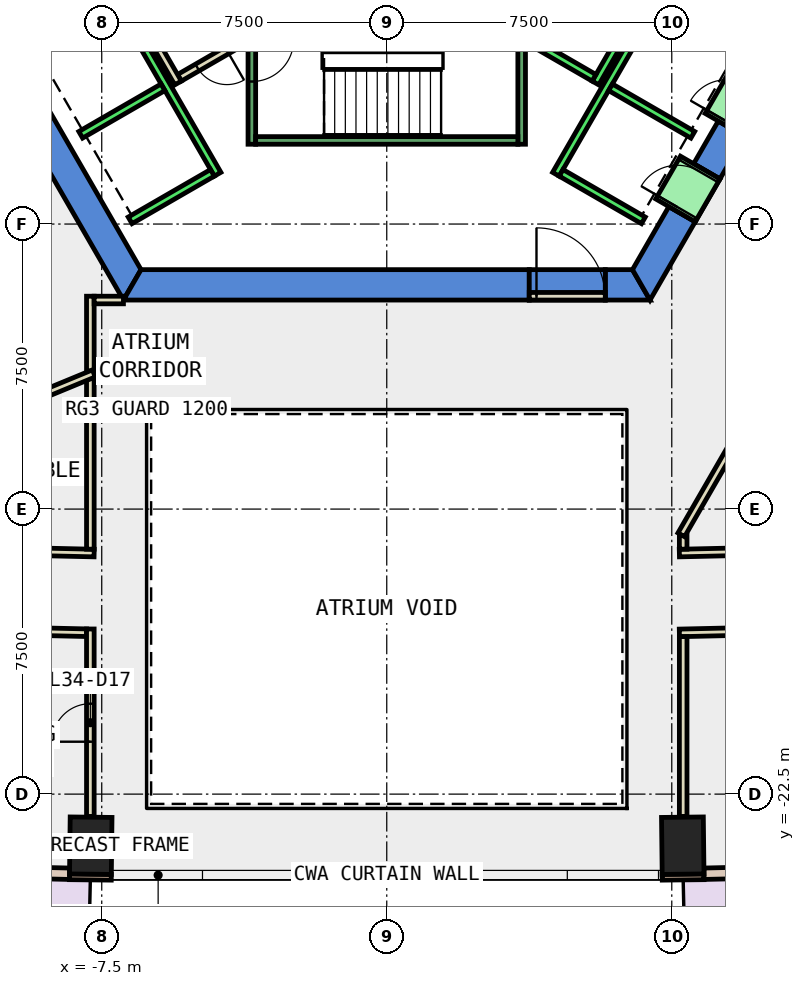
"""IFC4 building model, lengths in metres.
Left out: names, types, materials, properties, quantities, classifications, styles, units other than length and angle.
Written with IfcOpenShell. Run it as: python <this file> out.ifc"""

import sys

from ifc_helpers import new_model, si_unit, direction, frame, frame_2d, origin, origin_2d, place, context, subcontext, project, spatial, polyline, rectangle, outline, extrude, element, fill, save


model = new_model("IFC4")
c1 = context("Model", 3, precision=1e-05, world=origin(), true_north=direction((0.0, 1.0)))
c2 = subcontext(c1, "Body", "Model", "MODEL_VIEW")
j1 = project(units=[si_unit("LENGTHUNIT", "METRE"), si_unit("PLANEANGLEUNIT", "RADIAN")], contexts=[c1])
p1 = place(None, origin())
s1 = spatial("IfcSite", under=j1, at=p1, CompositionType="ELEMENT")
p2 = place(p1, origin())
s2 = spatial("IfcBuilding", under=s1, at=p2, CompositionType="ELEMENT")
p3 = place(p2, frame((0.0, 0.0, 155.0)))
s3 = spatial("IfcBuildingStorey", under=s2, at=p3, CompositionType="ELEMENT", Elevation=155.0)
for number, where, z_axis, x_axis in (
    (1, (-7.789, -23.857, -0.4), (0.0, 0.0, 1.0), (-1.0, 0.012, 0.0)),
    (2, (7.789, -23.857, -0.4), (0.0, 0.0, 1.0), (1.0, 0.012, 0.0)),
):
    element("IfcColumn", number, at=place(p3, frame(where, z_axis=z_axis, x_axis=x_axis)), inside=s3, PredefinedType="COLUMN", context=c2, shape_type="SweptSolid", body=[
        extrude(rectangle(XDim=1.1, YDim=1.5, at=origin_2d()), origin(), (0.0, 0.0, 1.0), 4.2),
    ])
p4 = place(p3, frame((0.0, 0.0, -0.4)))
e3 = element("IfcWall", 3, at=p4, inside=s3, PredefinedType="SHEAR", context=c2, shape_type="SweptSolid", body=[
    extrude(outline(polyline([(-13.856, 2.5), (-6.928, -9.5), (-6.466, -8.7), (-12.933, 2.5), (-13.856, 2.5)])), origin(), (0.0, 0.0, 1.0), 4.2),
])
p5 = place(p3, frame((0.0, 0.0, -0.4)))
e4 = element("IfcWall", 4, at=p5, inside=s3, PredefinedType="SHEAR", context=c2, shape_type="SweptSolid", body=[
    extrude(outline(polyline([(3.75, -9.5), (3.75, -8.7), (-6.466, -8.7), (-6.928, -9.5), (3.75, -9.5)])), origin(), (0.0, 0.0, 1.0), 4.2),
])
p6 = place(p3, frame((0.0, 0.0, -0.4)))
e5 = element("IfcWall", 5, at=p6, inside=s3, PredefinedType="SHEAR", context=c2, shape_type="SweptSolid", body=[
    extrude(outline(polyline([(5.75, -8.7), (5.75, -9.5), (6.928, -9.5), (6.466, -8.7), (5.75, -8.7)])), origin(), (0.0, 0.0, 1.0), 4.2),
])
p7 = place(p3, frame((0.0, 0.0, 3.6)))
e6 = element("IfcWall", 6, at=p7, inside=s3, PredefinedType="SHEAR", context=c2, shape_type="SweptSolid", body=[
    extrude(outline(polyline([(5.75, -9.5), (5.75, -8.7), (3.75, -8.7), (3.75, -9.5), (5.75, -9.5)])), origin(), (0.0, 0.0, 1.0), 0.2),
])
p8 = place(p3, frame((0.0, 0.0, -0.4)))
e7 = element("IfcWall", 7, at=p8, inside=s3, PredefinedType="SHEAR", context=c2, shape_type="SweptSolid", body=[
    extrude(outline(polyline([(8.117, -7.44), (7.424, -7.04), (6.466, -8.7), (6.928, -9.5), (8.117, -7.44)])), origin(), (0.0, 0.0, 1.0), 4.2),
])
p9 = place(p3, frame((0.0, 0.0, -0.4)))
e8 = element("IfcWall", 8, at=p9, inside=s3, PredefinedType="SHEAR", context=c2, shape_type="SweptSolid", body=[
    extrude(outline(polyline([(9.417, -5.189), (8.724, -4.789), (8.075, -5.914), (8.767, -6.314), (9.417, -5.189)])), origin(), (0.0, 0.0, 1.0), 4.2),
])
p10 = place(p3, frame((0.0, 0.0, 3.6)))
e9 = element("IfcWall", 9, at=p10, inside=s3, PredefinedType="SHEAR", context=c2, shape_type="SweptSolid", body=[
    extrude(outline(polyline([(8.767, -6.314), (8.075, -5.914), (7.424, -7.04), (8.117, -7.44), (8.767, -6.314)])), origin(), (0.0, 0.0, 1.0), 0.2),
])
p11 = place(p3, frame((0.0, 0.0, 3.6)))
e10 = element("IfcWall", 10, at=p11, inside=s3, PredefinedType="SHEAR", context=c2, shape_type="SweptSolid", body=[
    extrude(outline(polyline([(10.067, -4.063), (9.374, -3.663), (8.724, -4.789), (9.417, -5.189), (10.067, -4.063)])), origin(), (0.0, 0.0, 1.0), 0.2),
])
for number, where, z_axis, x_axis in (
    (11, (-8.349, -24.676, 0.0), (0.0, 0.0, 1.0), (1.0, -0.011, 0.0)),
    (12, (7.249, -24.688, 0.0), (0.0, 0.0, 1.0), (1.0, 0.011, 0.0)),
):
    element("IfcWall", number, at=place(p3, frame(where, z_axis=z_axis, x_axis=x_axis)), inside=s3, PredefinedType="STANDARD", context=c2, shape_type="SweptSolid", body=[
        extrude(rectangle(XDim=1.1, YDim=0.15, at=frame_2d((0.55, 0.0))), origin(), (0.0, 0.0, 1.0), 3.8),
    ])
p12 = place(p3, frame((-15.68, -24.429, 0.0), z_axis=(0.0, 0.0, 1.0), x_axis=(0.999743825009, -0.022633699594, 0.0)))
e13 = element("IfcWall", 13, at=p12, inside=s3, PredefinedType="STANDARD", context=c2, shape_type="SweptSolid", body=[
    extrude(rectangle(XDim=7.335, YDim=0.3, at=frame_2d((3.667, 0.0))), origin(), (0.0, 0.0, 1.0), 3.8),
])
p13 = place(p12, frame((0.834, 0.0, 0.0)))
e14 = element("IfcOpeningElement", 14, at=p13, cuts=e13, PredefinedType="OPENING", context=c2, shape_type="SweptSolid", body=[
    extrude(rectangle(XDim=2.0, YDim=2.4, at=frame_2d((1.0, 1.2))), frame((0.0, 0.16, 0.0), z_axis=(0.0, -1.0, 0.0), x_axis=(1.0, 0.0, 0.0)), (0.0, 0.0, 1.0), 0.32),
])
p14 = place(p12, frame((4.301, 0.0, 0.9)))
e15 = element("IfcOpeningElement", 15, at=p14, cuts=e13, PredefinedType="OPENING", context=c2, shape_type="SweptSolid", body=[
    extrude(rectangle(XDim=2.4, YDim=2.6, at=frame_2d((1.2, 1.3))), frame((0.0, 0.16, 0.0), z_axis=(0.0, -1.0, 0.0), x_axis=(1.0, 0.0, 0.0)), (0.0, 0.0, 1.0), 0.32),
])
p15 = place(p3, frame((8.347, -24.595, 0.0), z_axis=(0.0, 0.0, 1.0), x_axis=(0.999743825009, 0.022633699594, 0.0)))
e16 = element("IfcWall", 16, at=p15, inside=s3, PredefinedType="STANDARD", context=c2, shape_type="SweptSolid", body=[
    extrude(rectangle(XDim=7.335, YDim=0.3, at=frame_2d((3.667, 0.0))), origin(), (0.0, 0.0, 1.0), 3.8),
])
p16 = place(p15, frame((0.834, 0.0, 0.0)))
e17 = element("IfcOpeningElement", 17, at=p16, cuts=e16, PredefinedType="OPENING", context=c2, shape_type="SweptSolid", body=[
    extrude(rectangle(XDim=2.0, YDim=2.4, at=frame_2d((1.0, 1.2))), frame((0.0, 0.16, 0.0), z_axis=(0.0, -1.0, 0.0), x_axis=(1.0, 0.0, 0.0)), (0.0, 0.0, 1.0), 0.32),
])
p17 = place(p15, frame((4.301, 0.0, 0.9)))
e18 = element("IfcOpeningElement", 18, at=p17, cuts=e16, PredefinedType="OPENING", context=c2, shape_type="SweptSolid", body=[
    extrude(rectangle(XDim=2.4, YDim=2.6, at=frame_2d((1.2, 1.3))), frame((0.0, 0.16, 0.0), z_axis=(0.0, -1.0, 0.0), x_axis=(1.0, 0.0, 0.0)), (0.0, 0.0, 1.0), 0.32),
])
p18 = place(p3, frame((7.7, -16.157, 0.0), z_axis=(0.0, 0.0, 1.0), x_axis=(0.999744539931, 0.022602098978, 0.0)))
e19 = element("IfcWall", 19, at=p18, inside=s3, PredefinedType="PARTITIONING", context=c2, shape_type="SweptSolid", body=[
    extrude(rectangle(XDim=8.274, YDim=0.2, at=frame_2d((4.137, 0.0))), origin(), (0.0, 0.0, 1.0), 3.8),
])
p19 = place(p18, frame((3.237, 0.0, 0.0)))
e20 = element("IfcOpeningElement", 20, at=p19, cuts=e19, PredefinedType="OPENING", context=c2, shape_type="SweptSolid", body=[
    extrude(rectangle(XDim=1.8, YDim=2.1, at=frame_2d((0.9, 1.05))), frame((0.0, 0.11, 0.0), z_axis=(0.0, -1.0, 0.0), x_axis=(1.0, 0.0, 0.0)), (0.0, 0.0, 1.0), 0.22),
])
p20 = place(p3, frame((-14.356, -16.006, 0.0), z_axis=(0.0, 0.0, 1.0), x_axis=(0.999743177933, -0.022662263286, 0.0)))
e21 = element("IfcWall", 21, at=p20, inside=s3, PredefinedType="PARTITIONING", context=c2, shape_type="SweptSolid", body=[
    extrude(rectangle(XDim=6.658, YDim=0.2, at=frame_2d((3.329, 0.0))), origin(), (0.0, 0.0, 1.0), 3.8),
])
p21 = place(p20, frame((2.829, 0.0, 0.0)))
e22 = element("IfcOpeningElement", 22, at=p21, cuts=e21, PredefinedType="OPENING", context=c2, shape_type="SweptSolid", body=[
    extrude(rectangle(XDim=1.0, YDim=2.1, at=frame_2d((0.5, 1.05))), frame((0.0, 0.11, 0.0), z_axis=(0.0, -1.0, 0.0), x_axis=(1.0, 0.0, 0.0)), (0.0, 0.0, 1.0), 0.22),
])
p22 = place(p3, frame((16.111, -18.067, 0.0), z_axis=(0.0, 0.0, 1.0), x_axis=(-0.999741835545, -0.022721405353, 0.0)))
e23 = element("IfcWall", 23, at=p22, inside=s3, PredefinedType="PARTITIONING", context=c2, shape_type="SweptSolid", body=[
    extrude(rectangle(XDim=8.413, YDim=0.2, at=frame_2d((4.207, 0.0))), origin(), (0.0, 0.0, 1.0), 3.8),
])
p23 = place(p22, frame((3.706, 0.0, 0.0)))
e24 = element("IfcOpeningElement", 24, at=p23, cuts=e23, PredefinedType="OPENING", context=c2, shape_type="SweptSolid", body=[
    extrude(rectangle(XDim=1.0, YDim=2.1, at=frame_2d((0.5, 1.05))), frame((0.0, 0.11, 0.0), z_axis=(0.0, -1.0, 0.0), x_axis=(1.0, 0.0, 0.0)), (0.0, 0.0, 1.0), 0.22),
])
p24 = place(p3, frame((-7.9, -18.253, 0.0), z_axis=(0.0, 0.0, 1.0), x_axis=(-0.999745510411, 0.022559131487, 0.0)))
e25 = element("IfcWall", 25, at=p24, inside=s3, PredefinedType="PARTITIONING", context=c2, shape_type="SweptSolid", body=[
    extrude(rectangle(XDim=3.896, YDim=0.2, at=frame_2d((1.948, 0.0))), origin(), (0.0, 0.0, 1.0), 3.8),
])
p25 = place(p3, frame((-3.65, -2.61, 0.0), z_axis=(0.0, 0.0, 1.0), x_axis=(-0.866072462134, -0.499918483688, 0.0)))
e26 = element("IfcWall", 26, at=p25, inside=s3, PredefinedType="PARTITIONING", context=c2, shape_type="SweptSolid", body=[
    extrude(rectangle(XDim=2.084, YDim=0.2, at=frame_2d((1.042, 0.0))), origin(), (0.0, 0.0, 1.0), 3.8),
])
p26 = place(p25, frame((0.642, 0.0, 0.0)))
e27 = element("IfcOpeningElement", 27, at=p26, cuts=e26, PredefinedType="OPENING", context=c2, shape_type="SweptSolid", body=[
    extrude(rectangle(XDim=0.9, YDim=2.1, at=frame_2d((0.45, 1.05))), frame((0.0, 0.11, 0.0), z_axis=(0.0, -1.0, 0.0), x_axis=(1.0, 0.0, 0.0)), (0.0, 0.0, 1.0), 0.22),
])
p27 = place(p3, frame((-5.492, -3.788, 0.0), z_axis=(0.0, 0.0, 1.0), x_axis=(-0.500008949224, 0.866020236886, 0.0)))
e28 = element("IfcWall", 28, at=p27, inside=s3, PredefinedType="PARTITIONING", context=c2, shape_type="SweptSolid", body=[
    extrude(rectangle(XDim=2.68, YDim=0.2, at=frame_2d((1.34, 0.0))), origin(), (0.0, 0.0, 1.0), 3.8),
])
p28 = place(p3, frame((7.8, -15.69, 0.0), z_axis=(0.0, 0.0, 1.0), x_axis=(0.0, -1.0, 0.0)))
e29 = element("IfcWall", 29, at=p28, inside=s3, PredefinedType="PARTITIONING", context=c2, shape_type="SweptSolid", body=[
    extrude(rectangle(XDim=0.365, YDim=0.2, at=frame_2d((0.183, 0.0))), origin(), (0.0, 0.0, 1.0), 3.8),
])
p29 = place(p3, frame((-7.8, -11.368, 0.0), z_axis=(0.0, 0.0, 1.0), x_axis=(0.0, 1.0, 0.0)))
e30 = element("IfcWall", 30, at=p29, inside=s3, PredefinedType="PARTITIONING", context=c2, shape_type="SweptSolid", body=[
    extrude(rectangle(XDim=1.969, YDim=0.2, at=frame_2d((0.984, 0.0))), origin(), (0.0, 0.0, 1.0), 3.8),
])
p30 = place(p3, frame((-7.7, -9.499, 0.0), z_axis=(0.0, 0.0, 1.0), x_axis=(1.0, 0.0, 0.0)))
e31 = element("IfcWall", 31, at=p30, inside=s3, PredefinedType="PARTITIONING", context=c2, shape_type="SweptSolid", body=[
    extrude(rectangle(XDim=0.771, YDim=0.2, at=frame_2d((0.385, 0.0))), origin(), (0.0, 0.0, 1.0), 3.8),
])
p31 = place(p3, frame((-7.8, -16.055, 0.0), z_axis=(0.0, 0.0, 1.0), x_axis=(0.0, 1.0, 0.0)))
e32 = element("IfcWall", 32, at=p31, inside=s3, PredefinedType="PARTITIONING", context=c2, shape_type="SweptSolid", body=[
    extrude(rectangle(XDim=4.487, YDim=0.2, at=frame_2d((2.243, 0.0))), origin(), (0.0, 0.0, 1.0), 3.8),
])
p32 = place(p3, frame((7.8, -18.355, 0.0), z_axis=(0.0, 0.0, 1.0), x_axis=(0.0, -1.0, 0.0)))
e33 = element("IfcWall", 33, at=p32, inside=s3, PredefinedType="PARTITIONING", context=c2, shape_type="SweptSolid", body=[
    extrude(rectangle(XDim=4.732, YDim=0.2, at=frame_2d((2.366, 0.0))), origin(), (0.0, 0.0, 1.0), 3.8),
])
p33 = place(p3, frame((-7.8, -23.087, 0.0), z_axis=(0.0, 0.0, 1.0), x_axis=(0.0, 1.0, 0.0)))
e34 = element("IfcWall", 34, at=p33, inside=s3, PredefinedType="PARTITIONING", context=c2, shape_type="SweptSolid", body=[
    extrude(rectangle(XDim=4.932, YDim=0.2, at=frame_2d((2.466, 0.0))), origin(), (0.0, 0.0, 1.0), 3.8),
])
p34 = place(p33, frame((1.966, 0.0, 0.0)))
e35 = element("IfcOpeningElement", 35, at=p34, cuts=e34, PredefinedType="OPENING", context=c2, shape_type="SweptSolid", body=[
    extrude(rectangle(XDim=1.0, YDim=2.1, at=frame_2d((0.5, 1.05))), frame((0.0, 0.11, 0.0), z_axis=(0.0, -1.0, 0.0), x_axis=(1.0, 0.0, 0.0)), (0.0, 0.0, 1.0), 0.22),
])
p35 = place(p3, frame((-7.708, -11.43, 0.0), z_axis=(0.0, 0.0, 1.0), x_axis=(-0.924285151797, -0.381702709144, 0.0)))
e36 = element("IfcWall", 36, at=p35, inside=s3, PredefinedType="PARTITIONING", context=c2, shape_type="SweptSolid", body=[
    extrude(rectangle(XDim=8.129, YDim=0.2, at=frame_2d((4.065, 0.0))), origin(), (0.0, 0.0, 1.0), 3.8),
])
p36 = place(p3, frame((3.75, -9.4, 0.0), z_axis=(0.0, 0.0, 1.0), x_axis=(1.0, 0.0, 0.0)))
e37 = element("IfcWall", 37, at=p36, inside=s3, PredefinedType="PARTITIONING", context=c2, shape_type="SweptSolid", body=[
    extrude(rectangle(XDim=2.0, YDim=0.2, at=frame_2d((1.0, 0.0))), origin(), (0.0, 0.0, 1.0), 2.4),
])
p37 = place(p36, frame((0.19, 0.0, 0.0)))
e38 = element("IfcOpeningElement", 38, at=p37, cuts=e37, PredefinedType="OPENING", context=c2, shape_type="SweptSolid", body=[
    extrude(rectangle(XDim=1.8, YDim=2.1, at=frame_2d((0.9, 1.05))), frame((0.0, 0.11, 0.0), z_axis=(0.0, -1.0, 0.0), x_axis=(1.0, 0.0, 0.0)), (0.0, 0.0, 1.0), 0.22),
])
p38 = place(p3, frame((12.401, -7.621, 0.0), z_axis=(0.0, 0.0, 1.0), x_axis=(-0.499983724212, -0.866034800411, 0.0)))
e39 = element("IfcWall", 39, at=p38, inside=s3, PredefinedType="PARTITIONING", context=c2, shape_type="SweptSolid", body=[
    extrude(rectangle(XDim=9.302, YDim=0.2, at=frame_2d((4.651, 0.0))), origin(), (0.0, 0.0, 1.0), 3.8),
])
p39 = place(p3, frame((-9.751, 2.99, 0.0), z_axis=(0.0, 0.0, 1.0), x_axis=(0.50000090737, -0.866024879913, 0.0)))
e40 = element("IfcWall", 40, at=p39, inside=s3, PredefinedType="STANDARD", context=c2, shape_type="SweptSolid", body=[
    extrude(rectangle(XDim=10.6, YDim=0.2, at=frame_2d((5.3, 0.0))), origin(), (0.0, 0.0, 1.0), 3.8),
])
for number, where, z_axis, x_axis in (
    (41, (-5.888, -3.902, 0.0), (0.0, 0.0, 1.0), (-0.866, -0.5, 0.0)),
    (42, (-4.588, -6.153, 0.0), (0.0, 0.0, 1.0), (-0.866, -0.5, 0.0)),
):
    element("IfcWall", number, at=place(p3, frame(where, z_axis=z_axis, x_axis=x_axis)), inside=s3, PredefinedType="STANDARD", context=c2, shape_type="SweptSolid", body=[
        extrude(rectangle(XDim=2.5, YDim=0.2, at=frame_2d((1.25, 0.0))), origin(), (0.0, 0.0, 1.0), 3.8),
    ])
p40 = place(p3, frame((5.492, -3.788, 0.0), z_axis=(0.0, 0.0, 1.0), x_axis=(0.500011755427, 0.866018616679, 0.0)))
e43 = element("IfcWall", 43, at=p40, inside=s3, PredefinedType="STANDARD", context=c2, shape_type="SweptSolid", body=[
    extrude(rectangle(XDim=2.8, YDim=0.2, at=frame_2d((1.4, 0.0))), origin(), (0.0, 0.0, 1.0), 3.8),
])
p41 = place(p3, frame((3.377, -2.452, 0.0), z_axis=(0.0, 0.0, 1.0), x_axis=(0.865955154139, -0.50012165622, 0.0)))
e44 = element("IfcWall", 44, at=p41, inside=s3, PredefinedType="STANDARD", context=c2, shape_type="SweptSolid", body=[
    extrude(rectangle(XDim=2.4, YDim=0.2, at=frame_2d((1.2, 0.0))), origin(), (0.0, 0.0, 1.0), 3.8),
])
p42 = place(p3, frame((4.451, -6.19, 0.0), z_axis=(0.0, 0.0, 1.0), x_axis=(0.50000090737, 0.866024879913, 0.0)))
e45 = element("IfcWall", 45, at=p42, inside=s3, PredefinedType="STANDARD", context=c2, shape_type="SweptSolid", body=[
    extrude(rectangle(XDim=10.6, YDim=0.2, at=frame_2d((5.3, 0.0))), origin(), (0.0, 0.0, 1.0), 3.8),
])
for number, where, z_axis, x_axis in (
    (46, (4.588, -6.153, 0.0), (0.0, 0.0, 1.0), (0.866, -0.5, 0.0)),
    (47, (5.888, -3.902, 0.0), (0.0, 0.0, 1.0), (0.866, -0.5, 0.0)),
):
    element("IfcWall", number, at=place(p3, frame(where, z_axis=z_axis, x_axis=x_axis)), inside=s3, PredefinedType="STANDARD", context=c2, shape_type="SweptSolid", body=[
        extrude(rectangle(XDim=2.5, YDim=0.2, at=frame_2d((1.25, 0.0))), origin(), (0.0, 0.0, 1.0), 3.8),
    ])
p43 = place(p3, frame((7.598, -7.14, 0.0), z_axis=(0.0, 0.0, 1.0), x_axis=(0.500362116554, 0.865816234728, 0.0)))
e48 = element("IfcWall", 48, at=p43, inside=s3, PredefinedType="STANDARD", context=c2, shape_type="SweptSolid", body=[
    extrude(rectangle(XDim=1.299, YDim=1.2, at=frame_2d((0.65, 0.0))), origin(), (0.0, 0.0, 1.0), 2.4),
])
p44 = place(p43, frame((0.1, 0.0, 0.0)))
e49 = element("IfcOpeningElement", 49, at=p44, cuts=e48, PredefinedType="OPENING", context=c2, shape_type="SweptSolid", body=[
    extrude(rectangle(XDim=1.1, YDim=2.3, at=frame_2d((0.55, 1.15))), frame((0.0, 0.61, 0.0), z_axis=(0.0, -1.0, 0.0), x_axis=(1.0, 0.0, 0.0)), (0.0, 0.0, 1.0), 1.22),
])
p45 = place(p3, frame((8.898, -4.889, 0.0), z_axis=(0.0, 0.0, 1.0), x_axis=(0.500036693733, 0.866004217611, 0.0)))
e50 = element("IfcWall", 50, at=p45, inside=s3, PredefinedType="STANDARD", context=c2, shape_type="SweptSolid", body=[
    extrude(rectangle(XDim=1.3, YDim=1.2, at=frame_2d((0.65, 0.0))), origin(), (0.0, 0.0, 1.0), 2.4),
])
p46 = place(p45, frame((0.1, 0.0, 0.0)))
e51 = element("IfcOpeningElement", 51, at=p46, cuts=e50, PredefinedType="OPENING", context=c2, shape_type="SweptSolid", body=[
    extrude(rectangle(XDim=1.1, YDim=2.3, at=frame_2d((0.55, 1.15))), frame((0.0, 0.61, 0.0), z_axis=(0.0, -1.0, 0.0), x_axis=(1.0, 0.0, 0.0)), (0.0, 0.0, 1.0), 1.22),
])
p47 = place(p3, frame((-3.55, -1.0, 0.0), z_axis=(0.0, 0.0, 1.0), x_axis=(0.0, -1.0, 0.0)))
e52 = element("IfcWall", 52, at=p47, inside=s3, PredefinedType="STANDARD", context=c2, shape_type="SweptSolid", body=[
    extrude(rectangle(XDim=4.4, YDim=0.2, at=frame_2d((2.2, 0.0))), origin(), (0.0, 0.0, 1.0), 3.8),
])
p48 = place(p47, frame((1.65, 0.0, 0.0)))
e53 = element("IfcOpeningElement", 53, at=p48, cuts=e52, PredefinedType="OPENING", context=c2, shape_type="SweptSolid", body=[
    extrude(rectangle(XDim=1.1, YDim=2.2, at=frame_2d((0.55, 1.1))), frame((0.0, 0.11, 0.0), z_axis=(0.0, -1.0, 0.0), x_axis=(1.0, 0.0, 0.0)), (0.0, 0.0, 1.0), 0.22),
])
p49 = place(p3, frame((3.55, -2.667, 0.0), z_axis=(0.0, 0.0, 1.0), x_axis=(0.0, -1.0, 0.0)))
e54 = element("IfcWall", 54, at=p49, inside=s3, PredefinedType="STANDARD", context=c2, shape_type="SweptSolid", body=[
    extrude(rectangle(XDim=2.733, YDim=0.2, at=frame_2d((1.366, 0.0))), origin(), (0.0, 0.0, 1.0), 3.8),
])
p50 = place(p3, frame((-3.45, -5.3, 0.0), z_axis=(0.0, 0.0, 1.0), x_axis=(1.0, 0.0, 0.0)))
e55 = element("IfcWall", 55, at=p50, inside=s3, PredefinedType="STANDARD", context=c2, shape_type="SweptSolid", body=[
    extrude(rectangle(XDim=6.9, YDim=0.2, at=frame_2d((3.45, 0.0))), origin(), (0.0, 0.0, 1.0), 3.8),
])
p51 = place(p34, origin())
e56 = element("IfcDoor", 56, at=p51, inside=s3, OperationType="SINGLE_SWING_LEFT", PredefinedType="DOOR", context=c2, shape_type="SweptSolid", body=[
    extrude(rectangle(XDim=1.0, YDim=2.1, at=frame_2d((0.5, 1.05))), frame((0.0, 0.025, 0.0), z_axis=(0.0, -1.0, 0.0), x_axis=(1.0, 0.0, 0.0)), (0.0, 0.0, 1.0), 0.05),
])
fill(e35, e56)
p52 = place(p26, origin())
e57 = element("IfcDoor", 57, at=p52, inside=s3, OperationType="SINGLE_SWING_LEFT", PredefinedType="DOOR", context=c2, shape_type="SweptSolid", body=[
    extrude(rectangle(XDim=0.9, YDim=2.1, at=frame_2d((0.45, 1.05))), frame((0.0, 0.025, 0.0), z_axis=(0.0, -1.0, 0.0), x_axis=(1.0, 0.0, 0.0)), (0.0, 0.0, 1.0), 0.05),
])
fill(e27, e57)
p53 = place(p37, origin())
e58 = element("IfcDoor", 58, at=p53, inside=s3, OperationType="DOUBLE_DOOR_SINGLE_SWING", PredefinedType="DOOR", context=c2, shape_type="SweptSolid", body=[
    extrude(rectangle(XDim=1.8, YDim=2.1, at=frame_2d((0.9, 1.05))), frame((0.0, 0.025, 0.0), z_axis=(0.0, -1.0, 0.0), x_axis=(1.0, 0.0, 0.0)), (0.0, 0.0, 1.0), 0.05),
])
fill(e38, e58)
p54 = place(p44, origin())
e59 = element("IfcDoor", 59, at=p54, inside=s3, OperationType="SLIDING_TO_LEFT", PredefinedType="DOOR", context=c2, shape_type="SweptSolid", body=[
    extrude(rectangle(XDim=1.1, YDim=2.3, at=frame_2d((0.55, 1.15))), frame((0.0, 0.025, 0.0), z_axis=(0.0, -1.0, 0.0), x_axis=(1.0, 0.0, 0.0)), (0.0, 0.0, 1.0), 0.05),
])
fill(e49, e59)
p55 = place(p48, origin())
e60 = element("IfcDoor", 60, at=p55, inside=s3, OperationType="SINGLE_SWING_LEFT", PredefinedType="DOOR", context=c2, shape_type="SweptSolid", body=[
    extrude(rectangle(XDim=1.1, YDim=2.2, at=frame_2d((0.55, 1.1))), frame((0.0, 0.025, 0.0), z_axis=(0.0, -1.0, 0.0), x_axis=(1.0, 0.0, 0.0)), (0.0, 0.0, 1.0), 0.05),
])
fill(e53, e60)
save(model, sys.argv[1])
